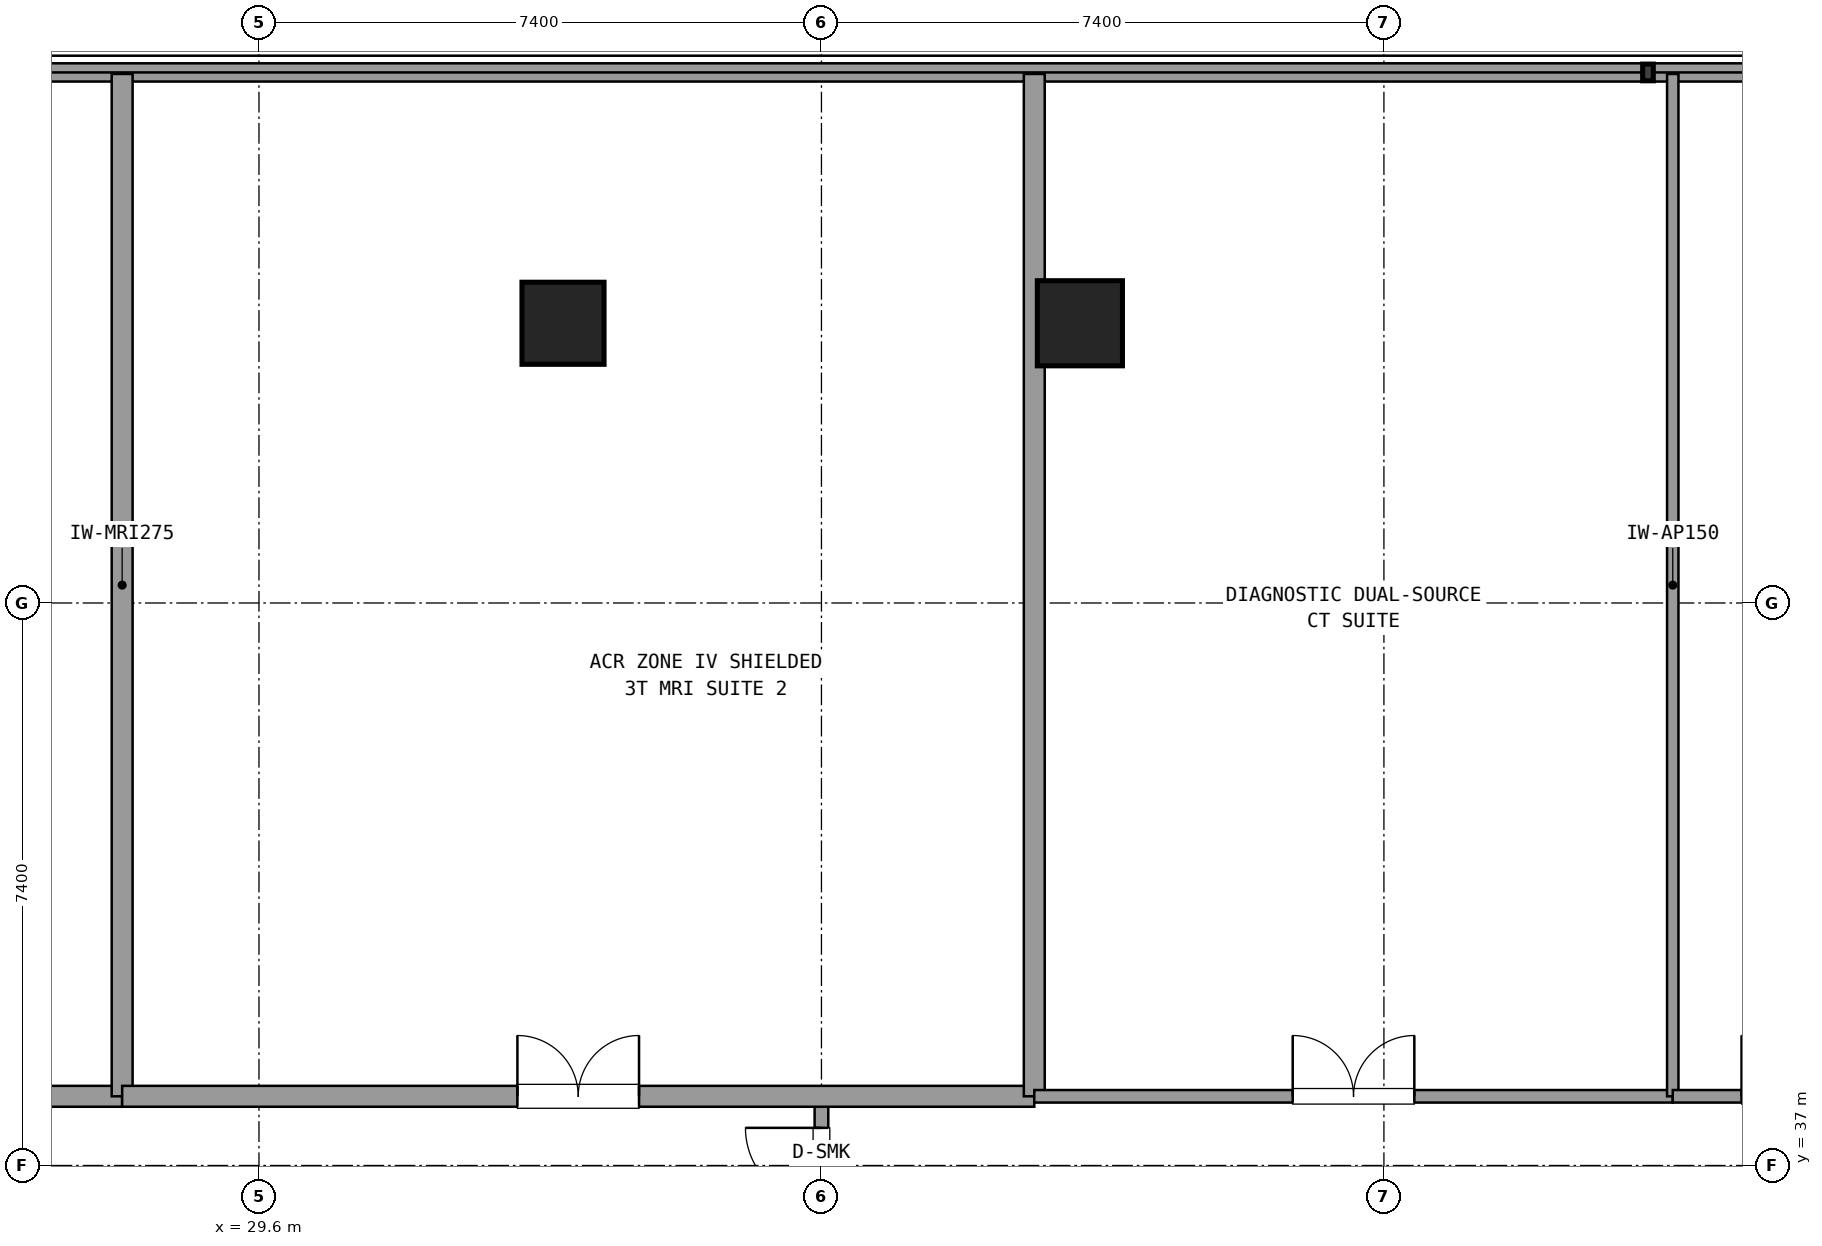
"""IFC4 building model, lengths in metres.
Left out: names, types, materials, properties, quantities, classifications, styles, units other than length and angle.
Written with IfcOpenShell. Run it as: python <this file> out.ifc"""

import sys

from ifc_helpers import new_model, si_unit, direction, frame, frame_2d, origin, origin_2d, place, context, subcontext, project, spatial, rectangle, circle, extrude, element, fill, save


model = new_model("IFC4")
c1 = context("Model", 3, precision=1e-05, world=origin(), true_north=direction((0.0, 1.0)))
c2 = subcontext(c1, "Body", "Model", "MODEL_VIEW")
j1 = project(units=[si_unit("LENGTHUNIT", "METRE"), si_unit("PLANEANGLEUNIT", "RADIAN")], contexts=[c1])
p1 = place(None, origin())
s1 = spatial("IfcSite", under=j1, at=p1, CompositionType="ELEMENT")
p2 = place(p1, origin())
s2 = spatial("IfcBuilding", under=s1, at=p2, CompositionType="ELEMENT")
p3 = place(p2, frame((0.0, 0.0, 9.9)))
s3 = spatial("IfcBuildingStorey", under=s2, at=p3, CompositionType="ELEMENT", Elevation=9.9)
p4 = place(p3, frame((40.4, 48.08, 0.0), z_axis=(0.0, 0.0, 1.0), x_axis=(1.0, 0.0, 0.0)))
e1 = element("IfcColumn", 1, at=p4, inside=s3, PredefinedType="COLUMN", context=c2, shape_type="SweptSolid", body=[
    extrude(circle(Radius=0.56, at=origin_2d()), origin(), (0.0, 0.0, 1.0), 4.5),
])
p5 = place(p3, frame((33.6, 48.08, 0.0), z_axis=(0.0, 0.0, 1.0), x_axis=(1.0, 0.0, 0.0)))
e2 = element("IfcColumn", 2, at=p5, inside=s3, PredefinedType="COLUMN", context=c2, shape_type="SweptSolid", body=[
    extrude(rectangle(XDim=1.08, YDim=1.08, at=origin_2d()), origin(), (0.0, 0.0, 1.0), 4.5),
])
p6 = place(p3, frame((69.621, 51.38, 0.0), z_axis=(0.0, 0.0, 1.0), x_axis=(-1.0, 0.0, 0.0)))
e3 = element("IfcWall", 3, at=p6, inside=s3, PredefinedType="SOLIDWALL", context=c2, shape_type="SweptSolid", body=[
    extrude(rectangle(XDim=65.242, YDim=0.24, at=frame_2d((32.621, 0.0))), origin(), (0.0, 0.0, 1.0), 0.85),
])
p7 = place(p3, frame((37.0, 35.08, 0.0), z_axis=(0.0, 0.0, 1.0), x_axis=(0.0, 1.0, 0.0)))
e4 = element("IfcWall", 4, at=p7, inside=s3, PredefinedType="PARTITIONING", context=c2, shape_type="SweptSolid", body=[
    extrude(rectangle(XDim=2.83, YDim=0.18, at=frame_2d((1.415, 0.0))), origin(), (0.0, 0.0, 1.0), 3.21),
])
p8 = place(p7, frame((0.415, 0.0, 0.0)))
e5 = element("IfcOpeningElement", 5, at=p8, cuts=e4, PredefinedType="OPENING", context=c2, shape_type="SweptSolid", body=[
    extrude(rectangle(XDim=2.0, YDim=2.2, at=frame_2d((1.0, 1.1))), frame((0.0, 0.1, 0.0), z_axis=(0.0, -1.0, 0.0), x_axis=(1.0, 0.0, 0.0)), (0.0, 0.0, 1.0), 0.2),
])
p9 = place(p3, frame((22.39, 37.91, 0.0), z_axis=(0.0, 0.0, 1.0), x_axis=(1.0, 0.0, 0.0)))
e6 = element("IfcWall", 6, at=p9, inside=s3, PredefinedType="PARTITIONING", context=c2, shape_type="SweptSolid", body=[
    extrude(rectangle(XDim=5.41, YDim=0.275, at=frame_2d((2.705, 0.0))), origin(), (0.0, 0.0, 1.0), 3.21),
])
p10 = place(p9, frame((1.905, 0.0, 0.0)))
e7 = element("IfcOpeningElement", 7, at=p10, cuts=e6, PredefinedType="OPENING", context=c2, shape_type="SweptSolid", body=[
    extrude(rectangle(XDim=1.6, YDim=2.2, at=frame_2d((0.8, 1.1))), frame((0.0, 0.147, 0.0), z_axis=(0.0, -1.0, 0.0), x_axis=(1.0, 0.0, 0.0)), (0.0, 0.0, 1.0), 0.295),
])
p11 = place(p3, frame((27.8, 37.91, 0.0), z_axis=(0.0, 0.0, 1.0), x_axis=(0.0, 1.0, 0.0)))
e8 = element("IfcWall", 8, at=p11, inside=s3, PredefinedType="PARTITIONING", context=c2, shape_type="SweptSolid", body=[
    extrude(rectangle(XDim=13.45, YDim=0.275, at=frame_2d((6.725, 0.0))), origin(), (0.0, 0.0, 1.0), 3.21),
])
p12 = place(p3, frame((27.8, 37.91, 0.0), z_axis=(0.0, 0.0, 1.0), x_axis=(1.0, 0.0, 0.0)))
e9 = element("IfcWall", 9, at=p12, inside=s3, PredefinedType="PARTITIONING", context=c2, shape_type="SweptSolid", body=[
    extrude(rectangle(XDim=12.0, YDim=0.275, at=frame_2d((6.0, 0.0))), origin(), (0.0, 0.0, 1.0), 3.21),
])
p13 = place(p12, frame((5.2, 0.0, 0.0)))
e10 = element("IfcOpeningElement", 10, at=p13, cuts=e9, PredefinedType="OPENING", context=c2, shape_type="SweptSolid", body=[
    extrude(rectangle(XDim=1.6, YDim=2.2, at=frame_2d((0.8, 1.1))), frame((0.0, 0.147, 0.0), z_axis=(0.0, -1.0, 0.0), x_axis=(1.0, 0.0, 0.0)), (0.0, 0.0, 1.0), 0.295),
])
p14 = place(p3, frame((39.8, 37.91, 0.0), z_axis=(0.0, 0.0, 1.0), x_axis=(0.0, 1.0, 0.0)))
e11 = element("IfcWall", 11, at=p14, inside=s3, PredefinedType="PARTITIONING", context=c2, shape_type="SweptSolid", body=[
    extrude(rectangle(XDim=13.45, YDim=0.275, at=frame_2d((6.725, 0.0))), origin(), (0.0, 0.0, 1.0), 3.21),
])
p15 = place(p3, frame((39.8, 37.91, 0.0), z_axis=(0.0, 0.0, 1.0), x_axis=(1.0, 0.0, 0.0)))
e12 = element("IfcWall", 12, at=p15, inside=s3, PredefinedType="PARTITIONING", context=c2, shape_type="SweptSolid", body=[
    extrude(rectangle(XDim=8.4, YDim=0.165, at=frame_2d((4.2, 0.0))), origin(), (0.0, 0.0, 1.0), 3.21),
])
p16 = place(p15, frame((3.4, 0.0, 0.0)))
e13 = element("IfcOpeningElement", 13, at=p16, cuts=e12, PredefinedType="OPENING", context=c2, shape_type="SweptSolid", body=[
    extrude(rectangle(XDim=1.6, YDim=2.2, at=frame_2d((0.8, 1.1))), frame((0.0, 0.093, 0.0), z_axis=(0.0, -1.0, 0.0), x_axis=(1.0, 0.0, 0.0)), (0.0, 0.0, 1.0), 0.185),
])
p17 = place(p3, frame((48.2, 37.91, 0.0), z_axis=(0.0, 0.0, 1.0), x_axis=(0.0, 1.0, 0.0)))
e14 = element("IfcWall", 14, at=p17, inside=s3, PredefinedType="PARTITIONING", context=c2, shape_type="SweptSolid", body=[
    extrude(rectangle(XDim=13.45, YDim=0.15, at=frame_2d((6.725, 0.0))), origin(), (0.0, 0.0, 1.0), 3.21),
])
p18 = place(p3, frame((48.2, 37.91, 0.0), z_axis=(0.0, 0.0, 1.0), x_axis=(1.0, 0.0, 0.0)))
e15 = element("IfcWall", 15, at=p18, inside=s3, PredefinedType="PARTITIONING", context=c2, shape_type="SweptSolid", body=[
    extrude(rectangle(XDim=3.41, YDim=0.165, at=frame_2d((1.705, 0.0))), origin(), (0.0, 0.0, 1.0), 3.21),
])
p19 = place(p18, frame((0.905, 0.0, 0.0)))
e16 = element("IfcOpeningElement", 16, at=p19, cuts=e15, PredefinedType="OPENING", context=c2, shape_type="SweptSolid", body=[
    extrude(rectangle(XDim=1.6, YDim=2.2, at=frame_2d((0.8, 1.1))), frame((0.0, 0.093, 0.0), z_axis=(0.0, -1.0, 0.0), x_axis=(1.0, 0.0, 0.0)), (0.0, 0.0, 1.0), 0.185),
])
p20 = place(p8, origin())
e17 = element("IfcDoor", 17, at=p20, inside=s3, OperationType="DOUBLE_DOOR_SINGLE_SWING", PredefinedType="DOOR", context=c2, shape_type="SweptSolid", body=[
    extrude(rectangle(XDim=2.0, YDim=2.2, at=frame_2d((1.0, 1.1))), frame((0.0, 0.025, 0.0), z_axis=(0.0, -1.0, 0.0), x_axis=(1.0, 0.0, 0.0)), (0.0, 0.0, 1.0), 0.05),
])
fill(e5, e17)
p21 = place(p13, origin())
e18 = element("IfcDoor", 18, at=p21, inside=s3, OperationType="DOUBLE_DOOR_SINGLE_SWING", PredefinedType="DOOR", context=c2, shape_type="SweptSolid", body=[
    extrude(rectangle(XDim=1.6, YDim=2.2, at=frame_2d((0.8, 1.1))), frame((0.0, 0.025, 0.0), z_axis=(0.0, -1.0, 0.0), x_axis=(1.0, 0.0, 0.0)), (0.0, 0.0, 1.0), 0.05),
])
fill(e10, e18)
p22 = place(p16, origin())
e19 = element("IfcDoor", 19, at=p22, inside=s3, OperationType="DOUBLE_DOOR_SINGLE_SWING", PredefinedType="DOOR", context=c2, shape_type="SweptSolid", body=[
    extrude(rectangle(XDim=1.6, YDim=2.2, at=frame_2d((0.8, 1.1))), frame((0.0, 0.025, 0.0), z_axis=(0.0, -1.0, 0.0), x_axis=(1.0, 0.0, 0.0)), (0.0, 0.0, 1.0), 0.05),
])
fill(e13, e19)
p23 = place(p19, origin())
e20 = element("IfcDoor", 20, at=p23, inside=s3, OperationType="DOUBLE_DOOR_SINGLE_SWING", PredefinedType="DOOR", context=c2, shape_type="SweptSolid", body=[
    extrude(rectangle(XDim=1.6, YDim=2.2, at=frame_2d((0.8, 1.1))), frame((0.0, 0.025, 0.0), z_axis=(0.0, -1.0, 0.0), x_axis=(1.0, 0.0, 0.0)), (0.0, 0.0, 1.0), 0.05),
])
fill(e16, e20)
save(model, sys.argv[1])
